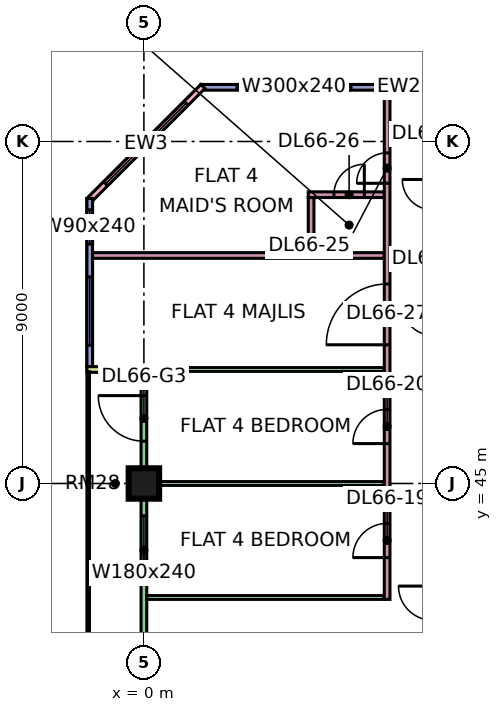
"""IFC4 building model, lengths in metres.
Left out: names, types, materials, properties, quantities, classifications, styles, units other than length and angle.
Written with IfcOpenShell. Run it as: python <this file> out.ifc"""

import sys

from ifc_helpers import new_model, si_unit, direction, frame, frame_2d, origin, origin_2d, place, context, subcontext, project, spatial, rectangle, extrude, element, fill, save


model = new_model("IFC4")
c1 = context("Model", 3, precision=1e-05, world=origin(), true_north=direction((0.0, 1.0)))
c2 = subcontext(c1, "Body", "Model", "MODEL_VIEW")
j1 = project(units=[si_unit("LENGTHUNIT", "METRE"), si_unit("PLANEANGLEUNIT", "RADIAN")], contexts=[c1])
p1 = place(None, origin())
s1 = spatial("IfcSite", under=j1, at=p1, CompositionType="ELEMENT")
p2 = place(p1, origin())
s2 = spatial("IfcBuilding", under=s1, at=p2, CompositionType="ELEMENT")
p3 = place(p2, frame((0.0, 0.0, 284.65)))
s3 = spatial("IfcBuildingStorey", under=s2, at=p3, CompositionType="ELEMENT", Elevation=284.65)
p4 = place(p3, frame((0.0, 45.0, 0.0), z_axis=(0.0, 0.0, 1.0), x_axis=(1.0, 0.0, 0.0)))
e1 = element("IfcColumn", 1, at=p4, inside=s3, PredefinedType="COLUMN", context=c2, shape_type="SweptSolid", body=[
    extrude(rectangle(XDim=0.8, YDim=0.8, at=origin_2d()), origin(), (0.0, 0.0, 1.0), 3.75),
])
p5 = place(p3, frame((11.925, 55.425, 0.0), z_axis=(0.0, 0.0, 1.0), x_axis=(-1.0, 0.0, 0.0)))
e2 = element("IfcWall", 2, at=p5, inside=s3, PredefinedType="SOLIDWALL", context=c2, shape_type="SweptSolid", body=[
    extrude(rectangle(XDim=10.425, YDim=0.15, at=frame_2d((5.212, 0.0))), origin(), (0.0, 0.0, 1.0), 3.35),
])
p6 = place(p5, frame((1.562, 0.0, 1.7)))
e3 = element("IfcOpeningElement", 3, at=p6, cuts=e2, PredefinedType="OPENING", context=c2, shape_type="SweptSolid", body=[
    extrude(rectangle(XDim=1.2, YDim=0.9, at=frame_2d((0.6, 0.45))), frame((0.0, 0.085, 0.0), z_axis=(0.0, -1.0, 0.0), x_axis=(1.0, 0.0, 0.0)), (0.0, 0.0, 1.0), 0.17),
])
p7 = place(p5, frame((6.475, 0.0, 0.45)))
e4 = element("IfcOpeningElement", 4, at=p7, cuts=e2, PredefinedType="OPENING", context=c2, shape_type="SweptSolid", body=[
    extrude(rectangle(XDim=3.0, YDim=2.4, at=frame_2d((1.5, 1.2))), frame((0.0, 0.085, 0.0), z_axis=(0.0, -1.0, 0.0), x_axis=(1.0, 0.0, 0.0)), (0.0, 0.0, 1.0), 0.17),
])
p8 = place(p3, frame((1.553, 55.447, 0.0), z_axis=(0.0, 0.0, 1.0), x_axis=(-0.707106781187, -0.707106781187, 0.0)))
e5 = element("IfcWall", 5, at=p8, inside=s3, PredefinedType="SOLIDWALL", context=c2, shape_type="SweptSolid", body=[
    extrude(rectangle(XDim=4.243, YDim=0.15, at=frame_2d((2.121, 0.0))), origin(), (0.0, 0.0, 1.0), 3.35),
])
p9 = place(p8, frame((0.621, 0.0, 0.45)))
e6 = element("IfcOpeningElement", 6, at=p9, cuts=e5, PredefinedType="OPENING", context=c2, shape_type="SweptSolid", body=[
    extrude(rectangle(XDim=3.0, YDim=2.4, at=frame_2d((1.5, 1.2))), frame((0.0, 0.085, 0.0), z_axis=(0.0, -1.0, 0.0), x_axis=(1.0, 0.0, 0.0)), (0.0, 0.0, 1.0), 0.17),
])
p10 = place(p3, frame((-1.425, 52.5, 0.0), z_axis=(0.0, 0.0, 1.0), x_axis=(0.0, -1.0, 0.0)))
e7 = element("IfcWall", 7, at=p10, inside=s3, PredefinedType="SOLIDWALL", context=c2, shape_type="SweptSolid", body=[
    extrude(rectangle(XDim=4.425, YDim=0.15, at=frame_2d((2.212, 0.0))), origin(), (0.0, 0.0, 1.0), 3.35),
])
p11 = place(p10, frame((0.3, 0.0, 0.45)))
e8 = element("IfcOpeningElement", 8, at=p11, cuts=e7, PredefinedType="OPENING", context=c2, shape_type="SweptSolid", body=[
    extrude(rectangle(XDim=0.9, YDim=2.4, at=frame_2d((0.45, 1.2))), frame((0.0, 0.085, 0.0), z_axis=(0.0, -1.0, 0.0), x_axis=(1.0, 0.0, 0.0)), (0.0, 0.0, 1.0), 0.17),
])
p12 = place(p10, frame((2.062, 0.0, 0.45)))
e9 = element("IfcOpeningElement", 9, at=p12, cuts=e7, PredefinedType="OPENING", context=c2, shape_type="SweptSolid", body=[
    extrude(rectangle(XDim=1.8, YDim=2.4, at=frame_2d((0.9, 1.2))), frame((0.0, 0.085, 0.0), z_axis=(0.0, -1.0, 0.0), x_axis=(1.0, 0.0, 0.0)), (0.0, 0.0, 1.0), 0.17),
])
p13 = place(p3, frame((0.0, 47.925, 0.0), z_axis=(0.0, 0.0, 1.0), x_axis=(0.0, -1.0, 0.0)))
e10 = element("IfcWall", 10, at=p13, inside=s3, PredefinedType="SOLIDWALL", context=c2, shape_type="SweptSolid", body=[
    extrude(rectangle(XDim=11.85, YDim=0.15, at=frame_2d((5.925, 0.0))), origin(), (0.0, 0.0, 1.0), 3.35),
])
p14 = place(p13, frame((0.613, 0.0, 0.0)))
e11 = element("IfcOpeningElement", 11, at=p14, cuts=e10, PredefinedType="OPENING", context=c2, shape_type="SweptSolid", body=[
    extrude(rectangle(XDim=1.2, YDim=2.4, at=frame_2d((0.6, 1.2))), frame((0.0, 0.085, 0.0), z_axis=(0.0, -1.0, 0.0), x_axis=(1.0, 0.0, 0.0)), (0.0, 0.0, 1.0), 0.17),
])
p15 = place(p13, frame((3.775, 0.0, 0.45)))
e12 = element("IfcOpeningElement", 12, at=p15, cuts=e10, PredefinedType="OPENING", context=c2, shape_type="SweptSolid", body=[
    extrude(rectangle(XDim=1.8, YDim=2.4, at=frame_2d((0.9, 1.2))), frame((0.0, 0.085, 0.0), z_axis=(0.0, -1.0, 0.0), x_axis=(1.0, 0.0, 0.0)), (0.0, 0.0, 1.0), 0.17),
])
p16 = place(p13, frame((7.175, 0.0, 0.45)))
e13 = element("IfcOpeningElement", 13, at=p16, cuts=e10, PredefinedType="OPENING", context=c2, shape_type="SweptSolid", body=[
    extrude(rectangle(XDim=3.0, YDim=2.4, at=frame_2d((1.5, 1.2))), frame((0.0, 0.085, 0.0), z_axis=(0.0, -1.0, 0.0), x_axis=(1.0, 0.0, 0.0)), (0.0, 0.0, 1.0), 0.17),
])
p17 = place(p3, frame((-1.5, 48.0, 0.0), z_axis=(0.0, 0.0, 1.0), x_axis=(1.0, 0.0, 0.0)))
e14 = element("IfcWall", 14, at=p17, inside=s3, PredefinedType="SOLIDWALL", context=c2, shape_type="SweptSolid", body=[
    extrude(rectangle(XDim=1.5, YDim=0.15, at=frame_2d((0.75, 0.0))), origin(), (0.0, 0.0, 1.0), 3.35),
])
p18 = place(p3, frame((-1.351, 51.0, 0.0), z_axis=(0.0, 0.0, 1.0), x_axis=(1.0, 0.0, 0.0)))
e15 = element("IfcWall", 15, at=p18, inside=s3, PredefinedType="PARTITIONING", context=c2, shape_type="SweptSolid", body=[
    extrude(rectangle(XDim=7.676, YDim=0.15, at=frame_2d((3.838, 0.0))), origin(), (0.0, 0.0, 1.0), 3.35),
])
p19 = place(p3, frame((0.0, 48.0, 0.0), z_axis=(0.0, 0.0, 1.0), x_axis=(1.0, 0.0, 0.0)))
e16 = element("IfcWall", 16, at=p19, inside=s3, PredefinedType="PARTITIONING", context=c2, shape_type="SweptSolid", body=[
    extrude(rectangle(XDim=6.325, YDim=0.1, at=frame_2d((3.163, 0.0))), origin(), (0.0, 0.0, 1.0), 3.35),
])
for number, where, z_axis, x_axis in (
    (17, (0.074, 42.0, 0.0), (0.0, 0.0, 1.0), (1.0, 0.0, 0.0)),
    (18, (0.074, 45.0, 0.0), (0.0, 0.0, 1.0), (1.0, 0.0, 0.0)),
):
    element("IfcWall", number, at=place(p3, frame(where, z_axis=z_axis, x_axis=x_axis)), inside=s3, PredefinedType="PARTITIONING", context=c2, shape_type="SweptSolid", body=[
        extrude(rectangle(XDim=6.251, YDim=0.1, at=frame_2d((3.125, 0.0))), origin(), (0.0, 0.0, 1.0), 3.35),
    ])
p20 = place(p3, frame((4.325, 52.6, 0.0), z_axis=(0.0, 0.0, 1.0), x_axis=(1.0, 0.0, 0.0)))
e19 = element("IfcWall", 19, at=p20, inside=s3, PredefinedType="PARTITIONING", context=c2, shape_type="SweptSolid", body=[
    extrude(rectangle(XDim=2.0, YDim=0.15, at=frame_2d((1.0, 0.0))), origin(), (0.0, 0.0, 1.0), 3.35),
])
p21 = place(p20, frame((0.675, 0.0, 0.0)))
e20 = element("IfcOpeningElement", 20, at=p21, cuts=e19, PredefinedType="OPENING", context=c2, shape_type="SweptSolid", body=[
    extrude(rectangle(XDim=0.8, YDim=2.1, at=frame_2d((0.4, 1.05))), frame((0.0, 0.085, 0.0), z_axis=(0.0, -1.0, 0.0), x_axis=(1.0, 0.0, 0.0)), (0.0, 0.0, 1.0), 0.17),
])
p22 = place(p3, frame((4.4, 51.075, 0.0), z_axis=(0.0, 0.0, 1.0), x_axis=(0.0, 1.0, 0.0)))
e21 = element("IfcWall", 21, at=p22, inside=s3, PredefinedType="PARTITIONING", context=c2, shape_type="SweptSolid", body=[
    extrude(rectangle(XDim=1.45, YDim=0.15, at=frame_2d((0.725, 0.0))), origin(), (0.0, 0.0, 1.0), 3.35),
])
p23 = place(p3, frame((6.4, 41.95, 0.0), z_axis=(0.0, 0.0, 1.0), x_axis=(0.0, 1.0, 0.0)))
e22 = element("IfcWall", 22, at=p23, inside=s3, PredefinedType="PARTITIONING", context=c2, shape_type="SweptSolid", body=[
    extrude(rectangle(XDim=13.4, YDim=0.15, at=frame_2d((6.7, 0.0))), origin(), (0.0, 0.0, 1.0), 3.35),
])
p24 = place(p23, frame((1.1, 0.0, 0.0)))
e23 = element("IfcOpeningElement", 23, at=p24, cuts=e22, PredefinedType="OPENING", context=c2, shape_type="SweptSolid", body=[
    extrude(rectangle(XDim=0.9, YDim=2.1, at=frame_2d((0.45, 1.05))), frame((0.0, 0.085, 0.0), z_axis=(0.0, -1.0, 0.0), x_axis=(1.0, 0.0, 0.0)), (0.0, 0.0, 1.0), 0.17),
])
p25 = place(p23, frame((4.1, 0.0, 0.0)))
e24 = element("IfcOpeningElement", 24, at=p25, cuts=e22, PredefinedType="OPENING", context=c2, shape_type="SweptSolid", body=[
    extrude(rectangle(XDim=0.9, YDim=2.1, at=frame_2d((0.45, 1.05))), frame((0.0, 0.085, 0.0), z_axis=(0.0, -1.0, 0.0), x_axis=(1.0, 0.0, 0.0)), (0.0, 0.0, 1.0), 0.17),
])
p26 = place(p23, frame((10.95, 0.0, 0.0)))
e25 = element("IfcOpeningElement", 25, at=p26, cuts=e22, PredefinedType="OPENING", context=c2, shape_type="SweptSolid", body=[
    extrude(rectangle(XDim=0.8, YDim=2.1, at=frame_2d((0.4, 1.05))), frame((0.0, 0.085, 0.0), z_axis=(0.0, -1.0, 0.0), x_axis=(1.0, 0.0, 0.0)), (0.0, 0.0, 1.0), 0.17),
])
p27 = place(p23, frame((6.7, 0.0, 0.0)))
e26 = element("IfcOpeningElement", 26, at=p27, cuts=e22, PredefinedType="OPENING", context=c2, shape_type="SweptSolid", body=[
    extrude(rectangle(XDim=1.6, YDim=2.1, at=frame_2d((0.8, 1.05))), frame((0.0, 0.085, 0.0), z_axis=(0.0, -1.0, 0.0), x_axis=(1.0, 0.0, 0.0)), (0.0, 0.0, 1.0), 0.17),
])
p28 = place(p7, origin())
e27 = element("IfcWindow", 27, at=p28, inside=s3, PartitioningType="SINGLE_PANEL", PredefinedType="WINDOW", context=c2, shape_type="SweptSolid", body=[
    extrude(rectangle(XDim=3.0, YDim=2.4, at=frame_2d((1.5, 1.2))), frame((0.0, 0.03, 0.0), z_axis=(0.0, -1.0, 0.0), x_axis=(1.0, 0.0, 0.0)), (0.0, 0.0, 1.0), 0.06),
])
fill(e4, e27)
p29 = place(p9, origin())
e28 = element("IfcWindow", 28, at=p29, inside=s3, PartitioningType="SINGLE_PANEL", PredefinedType="WINDOW", context=c2, shape_type="SweptSolid", body=[
    extrude(rectangle(XDim=3.0, YDim=2.4, at=frame_2d((1.5, 1.2))), frame((0.0, 0.03, 0.0), z_axis=(0.0, -1.0, 0.0), x_axis=(1.0, 0.0, 0.0)), (0.0, 0.0, 1.0), 0.06),
])
fill(e6, e28)
p30 = place(p11, origin())
e29 = element("IfcWindow", 29, at=p30, inside=s3, PartitioningType="SINGLE_PANEL", PredefinedType="WINDOW", context=c2, shape_type="SweptSolid", body=[
    extrude(rectangle(XDim=0.9, YDim=2.4, at=frame_2d((0.45, 1.2))), frame((0.0, 0.03, 0.0), z_axis=(0.0, -1.0, 0.0), x_axis=(1.0, 0.0, 0.0)), (0.0, 0.0, 1.0), 0.06),
])
fill(e8, e29)
p31 = place(p12, origin())
e30 = element("IfcWindow", 30, at=p31, inside=s3, PartitioningType="SINGLE_PANEL", PredefinedType="WINDOW", context=c2, shape_type="SweptSolid", body=[
    extrude(rectangle(XDim=1.8, YDim=2.4, at=frame_2d((0.9, 1.2))), frame((0.0, 0.03, 0.0), z_axis=(0.0, -1.0, 0.0), x_axis=(1.0, 0.0, 0.0)), (0.0, 0.0, 1.0), 0.06),
])
fill(e9, e30)
p32 = place(p14, frame((1.2, 0.0, 0.0), z_axis=(0.0, 0.0, 1.0), x_axis=(-1.0, 0.0, 0.0)))
e31 = element("IfcDoor", 31, at=p32, inside=s3, OperationType="DOUBLE_DOOR_SINGLE_SWING", PredefinedType="DOOR", context=c2, shape_type="SweptSolid", body=[
    extrude(rectangle(XDim=1.2, YDim=2.4, at=frame_2d((0.6, 1.2))), frame((0.0, 0.025, 0.0), z_axis=(0.0, -1.0, 0.0), x_axis=(1.0, 0.0, 0.0)), (0.0, 0.0, 1.0), 0.05),
])
fill(e11, e31)
p33 = place(p15, origin())
e32 = element("IfcWindow", 32, at=p33, inside=s3, PartitioningType="SINGLE_PANEL", PredefinedType="WINDOW", context=c2, shape_type="SweptSolid", body=[
    extrude(rectangle(XDim=1.8, YDim=2.4, at=frame_2d((0.9, 1.2))), frame((0.0, 0.03, 0.0), z_axis=(0.0, -1.0, 0.0), x_axis=(1.0, 0.0, 0.0)), (0.0, 0.0, 1.0), 0.06),
])
fill(e12, e32)
p34 = place(p24, origin())
e33 = element("IfcDoor", 33, at=p34, inside=s3, OperationType="SINGLE_SWING_LEFT", PredefinedType="DOOR", context=c2, shape_type="SweptSolid", body=[
    extrude(rectangle(XDim=0.9, YDim=2.1, at=frame_2d((0.45, 1.05))), frame((0.0, 0.025, 0.0), z_axis=(0.0, -1.0, 0.0), x_axis=(1.0, 0.0, 0.0)), (0.0, 0.0, 1.0), 0.05),
])
fill(e23, e33)
p35 = place(p25, origin())
e34 = element("IfcDoor", 34, at=p35, inside=s3, OperationType="SINGLE_SWING_LEFT", PredefinedType="DOOR", context=c2, shape_type="SweptSolid", body=[
    extrude(rectangle(XDim=0.9, YDim=2.1, at=frame_2d((0.45, 1.05))), frame((0.0, 0.025, 0.0), z_axis=(0.0, -1.0, 0.0), x_axis=(1.0, 0.0, 0.0)), (0.0, 0.0, 1.0), 0.05),
])
fill(e24, e34)
p36 = place(p26, origin())
e35 = element("IfcDoor", 35, at=p36, inside=s3, OperationType="SINGLE_SWING_LEFT", PredefinedType="DOOR", context=c2, shape_type="SweptSolid", body=[
    extrude(rectangle(XDim=0.8, YDim=2.1, at=frame_2d((0.4, 1.05))), frame((0.0, 0.025, 0.0), z_axis=(0.0, -1.0, 0.0), x_axis=(1.0, 0.0, 0.0)), (0.0, 0.0, 1.0), 0.05),
])
fill(e25, e35)
p37 = place(p21, frame((0.8, 0.0, 0.0), z_axis=(0.0, 0.0, 1.0), x_axis=(-1.0, 0.0, 0.0)))
e36 = element("IfcDoor", 36, at=p37, inside=s3, OperationType="SINGLE_SWING_RIGHT", PredefinedType="DOOR", context=c2, shape_type="SweptSolid", body=[
    extrude(rectangle(XDim=0.8, YDim=2.1, at=frame_2d((0.4, 1.05))), frame((0.0, 0.025, 0.0), z_axis=(0.0, -1.0, 0.0), x_axis=(1.0, 0.0, 0.0)), (0.0, 0.0, 1.0), 0.05),
])
fill(e20, e36)
p38 = place(p27, origin())
e37 = element("IfcDoor", 37, at=p38, inside=s3, OperationType="DOUBLE_DOOR_SINGLE_SWING", PredefinedType="DOOR", context=c2, shape_type="SweptSolid", body=[
    extrude(rectangle(XDim=1.6, YDim=2.1, at=frame_2d((0.8, 1.05))), frame((0.0, 0.025, 0.0), z_axis=(0.0, -1.0, 0.0), x_axis=(1.0, 0.0, 0.0)), (0.0, 0.0, 1.0), 0.05),
])
fill(e26, e37)
save(model, sys.argv[1])
